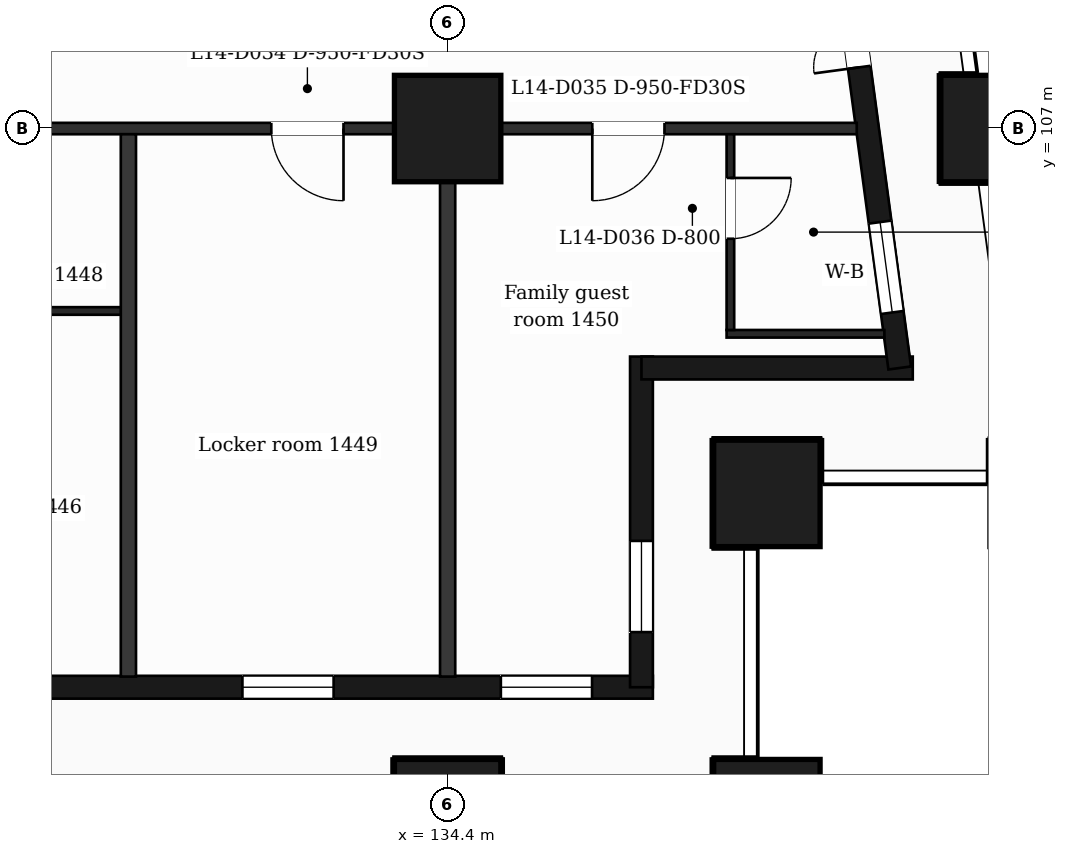
"""IFC4 building model, lengths in metres.
Left out: names, types, materials, properties, quantities, classifications, styles, units other than length and angle.
Written with IfcOpenShell. Run it as: python <this file> out.ifc"""

import sys

from ifc_helpers import new_model, si_unit, direction, frame, frame_2d, origin, origin_2d, place, context, subcontext, project, spatial, rectangle, extrude, element, fill, save


model = new_model("IFC4")
c1 = context("Model", 3, precision=1e-05, world=origin(), true_north=direction((0.0, 1.0)))
c2 = subcontext(c1, "Body", "Model", "MODEL_VIEW")
j1 = project(units=[si_unit("LENGTHUNIT", "METRE"), si_unit("PLANEANGLEUNIT", "RADIAN")], contexts=[c1])
p1 = place(None, origin())
s1 = spatial("IfcSite", under=j1, at=p1, CompositionType="ELEMENT")
p2 = place(p1, origin())
s2 = spatial("IfcBuilding", under=s1, at=p2, CompositionType="ELEMENT")
p3 = place(p2, frame((0.0, 0.0, 67.0)))
s3 = spatial("IfcBuildingStorey", under=s2, at=p3, CompositionType="ELEMENT", Elevation=67.0)
for number, where, z_axis, x_axis in (
    (1, (134.4, 98.0, 0.0), (0.0, 0.0, 1.0), (1.0, 0.0, 0.0)),
    (2, (138.6, 98.0, 0.0), (0.0, 0.0, 1.0), (1.0, 0.0, 0.0)),
    (3, (138.6, 102.2, 0.0), (0.0, 0.0, 1.0), (1.0, 0.0, 0.0)),
    (4, (134.4, 107.0, 0.0), (0.0, 0.0, 1.0), (1.0, 0.0, 0.0)),
    (5, (141.588, 107.0, 0.0), (0.0, 0.0, 1.0), (1.0, 0.0, 0.0)),
):
    element("IfcColumn", number, at=place(p3, frame(where, z_axis=z_axis, x_axis=x_axis)), inside=s3, PredefinedType="COLUMN", context=c2, shape_type="SweptSolid", body=[
        extrude(rectangle(XDim=1.4, YDim=1.4, at=origin_2d()), origin(), (0.0, 0.0, 1.0), 3.5),
    ])
p4 = place(p3, frame((89.85, 99.65, 0.0), z_axis=(0.0, 0.0, 1.0), x_axis=(1.0, 0.0, 0.0)))
e6 = element("IfcWall", 6, at=p4, inside=s3, PredefinedType="SOLIDWALL", context=c2, shape_type="SweptSolid", body=[
    extrude(rectangle(XDim=47.25, YDim=0.3, at=frame_2d((23.625, 0.0))), origin(), (0.0, 0.0, 1.0), 3.18),
])
p5 = place(p4, frame((0.725, 0.0, 0.9)))
e7 = element("IfcOpeningElement", 7, at=p5, cuts=e6, PredefinedType="OPENING", context=c2, shape_type="SweptSolid", body=[
    extrude(rectangle(XDim=1.2, YDim=2.1, at=frame_2d((0.6, 1.05))), frame((0.0, 0.16, 0.0), z_axis=(0.0, -1.0, 0.0), x_axis=(1.0, 0.0, 0.0)), (0.0, 0.0, 1.0), 0.32),
])
p6 = place(p4, frame((3.45, 0.0, 0.9)))
e8 = element("IfcOpeningElement", 8, at=p6, cuts=e6, PredefinedType="OPENING", context=c2, shape_type="SweptSolid", body=[
    extrude(rectangle(XDim=2.4, YDim=2.1, at=frame_2d((1.2, 1.05))), frame((0.0, 0.16, 0.0), z_axis=(0.0, -1.0, 0.0), x_axis=(1.0, 0.0, 0.0)), (0.0, 0.0, 1.0), 0.32),
])
p7 = place(p4, frame((8.25, 0.0, 0.9)))
e9 = element("IfcOpeningElement", 9, at=p7, cuts=e6, PredefinedType="OPENING", context=c2, shape_type="SweptSolid", body=[
    extrude(rectangle(XDim=1.2, YDim=2.1, at=frame_2d((0.6, 1.05))), frame((0.0, 0.16, 0.0), z_axis=(0.0, -1.0, 0.0), x_axis=(1.0, 0.0, 0.0)), (0.0, 0.0, 1.0), 0.32),
])
p8 = place(p4, frame((12.45, 0.0, 0.9)))
e10 = element("IfcOpeningElement", 10, at=p8, cuts=e6, PredefinedType="OPENING", context=c2, shape_type="SweptSolid", body=[
    extrude(rectangle(XDim=1.2, YDim=2.1, at=frame_2d((0.6, 1.05))), frame((0.0, 0.16, 0.0), z_axis=(0.0, -1.0, 0.0), x_axis=(1.0, 0.0, 0.0)), (0.0, 0.0, 1.0), 0.32),
])
p9 = place(p4, frame((16.05, 0.0, 0.9)))
e11 = element("IfcOpeningElement", 11, at=p9, cuts=e6, PredefinedType="OPENING", context=c2, shape_type="SweptSolid", body=[
    extrude(rectangle(XDim=2.4, YDim=2.1, at=frame_2d((1.2, 1.05))), frame((0.0, 0.16, 0.0), z_axis=(0.0, -1.0, 0.0), x_axis=(1.0, 0.0, 0.0)), (0.0, 0.0, 1.0), 0.32),
])
p10 = place(p4, frame((20.25, 0.0, 0.9)))
e12 = element("IfcOpeningElement", 12, at=p10, cuts=e6, PredefinedType="OPENING", context=c2, shape_type="SweptSolid", body=[
    extrude(rectangle(XDim=2.4, YDim=2.1, at=frame_2d((1.2, 1.05))), frame((0.0, 0.16, 0.0), z_axis=(0.0, -1.0, 0.0), x_axis=(1.0, 0.0, 0.0)), (0.0, 0.0, 1.0), 0.32),
])
p11 = place(p4, frame((25.05, 0.0, 0.0)))
e13 = element("IfcOpeningElement", 13, at=p11, cuts=e6, PredefinedType="OPENING", context=c2, shape_type="SweptSolid", body=[
    extrude(rectangle(XDim=1.2, YDim=2.4, at=frame_2d((0.6, 1.2))), frame((0.0, 0.16, 0.0), z_axis=(0.0, -1.0, 0.0), x_axis=(1.0, 0.0, 0.0)), (0.0, 0.0, 1.0), 0.32),
])
p12 = place(p4, frame((28.65, 0.0, 0.9)))
e14 = element("IfcOpeningElement", 14, at=p12, cuts=e6, PredefinedType="OPENING", context=c2, shape_type="SweptSolid", body=[
    extrude(rectangle(XDim=2.4, YDim=2.1, at=frame_2d((1.2, 1.05))), frame((0.0, 0.16, 0.0), z_axis=(0.0, -1.0, 0.0), x_axis=(1.0, 0.0, 0.0)), (0.0, 0.0, 1.0), 0.32),
])
p13 = place(p4, frame((32.85, 0.0, 0.9)))
e15 = element("IfcOpeningElement", 15, at=p13, cuts=e6, PredefinedType="OPENING", context=c2, shape_type="SweptSolid", body=[
    extrude(rectangle(XDim=2.4, YDim=2.1, at=frame_2d((1.2, 1.05))), frame((0.0, 0.16, 0.0), z_axis=(0.0, -1.0, 0.0), x_axis=(1.0, 0.0, 0.0)), (0.0, 0.0, 1.0), 0.32),
])
p14 = place(p4, frame((37.65, 0.0, 0.9)))
e16 = element("IfcOpeningElement", 16, at=p14, cuts=e6, PredefinedType="OPENING", context=c2, shape_type="SweptSolid", body=[
    extrude(rectangle(XDim=1.2, YDim=2.1, at=frame_2d((0.6, 1.05))), frame((0.0, 0.16, 0.0), z_axis=(0.0, -1.0, 0.0), x_axis=(1.0, 0.0, 0.0)), (0.0, 0.0, 1.0), 0.32),
])
p15 = place(p4, frame((41.85, 0.0, 0.9)))
e17 = element("IfcOpeningElement", 17, at=p15, cuts=e6, PredefinedType="OPENING", context=c2, shape_type="SweptSolid", body=[
    extrude(rectangle(XDim=1.2, YDim=2.1, at=frame_2d((0.6, 1.05))), frame((0.0, 0.16, 0.0), z_axis=(0.0, -1.0, 0.0), x_axis=(1.0, 0.0, 0.0)), (0.0, 0.0, 1.0), 0.32),
])
p16 = place(p4, frame((45.25, 0.0, 0.9)))
e18 = element("IfcOpeningElement", 18, at=p16, cuts=e6, PredefinedType="OPENING", context=c2, shape_type="SweptSolid", body=[
    extrude(rectangle(XDim=1.2, YDim=2.1, at=frame_2d((0.6, 1.05))), frame((0.0, 0.16, 0.0), z_axis=(0.0, -1.0, 0.0), x_axis=(1.0, 0.0, 0.0)), (0.0, 0.0, 1.0), 0.32),
])
p17 = place(p3, frame((136.95, 99.65, 0.0), z_axis=(0.0, 0.0, 1.0), x_axis=(0.0, 1.0, 0.0)))
e19 = element("IfcWall", 19, at=p17, inside=s3, PredefinedType="SOLIDWALL", context=c2, shape_type="SweptSolid", body=[
    extrude(rectangle(XDim=4.35, YDim=0.3, at=frame_2d((2.175, 0.0))), origin(), (0.0, 0.0, 1.0), 3.18),
])
p18 = place(p17, frame((0.725, 0.0, 0.9)))
e20 = element("IfcOpeningElement", 20, at=p18, cuts=e19, PredefinedType="OPENING", context=c2, shape_type="SweptSolid", body=[
    extrude(rectangle(XDim=1.2, YDim=2.1, at=frame_2d((0.6, 1.05))), frame((0.0, 0.16, 0.0), z_axis=(0.0, -1.0, 0.0), x_axis=(1.0, 0.0, 0.0)), (0.0, 0.0, 1.0), 0.32),
])
p19 = place(p3, frame((136.95, 103.85, 0.0), z_axis=(0.0, 0.0, 1.0), x_axis=(1.0, 0.0, 0.0)))
e21 = element("IfcWall", 21, at=p19, inside=s3, PredefinedType="SOLIDWALL", context=c2, shape_type="SweptSolid", body=[
    extrude(rectangle(XDim=3.569, YDim=0.3, at=frame_2d((1.785, 0.0))), origin(), (0.0, 0.0, 1.0), 3.18),
])
p20 = place(p3, frame((140.348, 103.85, 0.0), z_axis=(0.0, 0.0, 1.0), x_axis=(-0.133431549479, 0.991058031401, 0.0)))
e22 = element("IfcWall", 22, at=p20, inside=s3, PredefinedType="SOLIDWALL", context=c2, shape_type="SweptSolid", body=[
    extrude(rectangle(XDim=6.609, YDim=0.3, at=frame_2d((3.304, 0.0))), origin(), (0.0, 0.0, 1.0), 3.18),
])
p21 = place(p20, frame((0.737, 0.0, 0.9)))
e23 = element("IfcOpeningElement", 23, at=p21, cuts=e22, PredefinedType="OPENING", context=c2, shape_type="SweptSolid", body=[
    extrude(rectangle(XDim=1.2, YDim=2.1, at=frame_2d((0.6, 1.05))), frame((0.0, 0.16, 0.0), z_axis=(0.0, -1.0, 0.0), x_axis=(1.0, 0.0, 0.0)), (0.0, 0.0, 1.0), 0.32),
])
p22 = place(p20, frame((3.991, 0.0, 0.0)))
e24 = element("IfcOpeningElement", 24, at=p22, cuts=e22, PredefinedType="OPENING", context=c2, shape_type="SweptSolid", body=[
    extrude(rectangle(XDim=1.2, YDim=2.4, at=frame_2d((0.6, 1.2))), frame((0.0, 0.16, 0.0), z_axis=(0.0, -1.0, 0.0), x_axis=(1.0, 0.0, 0.0)), (0.0, 0.0, 1.0), 0.32),
])
p23 = place(p3, frame((138.07, 104.3, 0.0), z_axis=(0.0, 0.0, 1.0), x_axis=(1.0, 0.0, 0.0)))
e25 = element("IfcWall", 25, at=p23, inside=s3, PredefinedType="PARTITIONING", context=c2, shape_type="SweptSolid", body=[
    extrude(rectangle(XDim=2.076, YDim=0.1, at=frame_2d((1.038, 0.0))), origin(), (0.0, 0.0, 1.0), 3.18),
])
p24 = place(p3, frame((127.75, 104.6, 0.0), z_axis=(0.0, 0.0, 1.0), x_axis=(1.0, 0.0, 0.0)))
e26 = element("IfcWall", 26, at=p24, inside=s3, PredefinedType="PARTITIONING", context=c2, shape_type="SweptSolid", body=[
    extrude(rectangle(XDim=2.45, YDim=0.1, at=frame_2d((1.225, 0.0))), origin(), (0.0, 0.0, 1.0), 3.18),
])
p25 = place(p3, frame((87.018, 107.0, 0.0), z_axis=(0.0, 0.0, 1.0), x_axis=(1.0, 0.0, 0.0)))
e27 = element("IfcWall", 27, at=p25, inside=s3, PredefinedType="PARTITIONING", context=c2, shape_type="SweptSolid", body=[
    extrude(rectangle(XDim=52.765, YDim=0.15, at=frame_2d((26.382, 0.0))), origin(), (0.0, 0.0, 1.0), 3.18),
])
p26 = place(p25, frame((0.87, 0.0, 0.0)))
e28 = element("IfcOpeningElement", 28, at=p26, cuts=e27, PredefinedType="OPENING", context=c2, shape_type="SweptSolid", body=[
    extrude(rectangle(XDim=0.95, YDim=2.1, at=frame_2d((0.475, 1.05))), frame((0.0, 0.085, 0.0), z_axis=(0.0, -1.0, 0.0), x_axis=(1.0, 0.0, 0.0)), (0.0, 0.0, 1.0), 0.17),
])
p27 = place(p25, frame((6.332, 0.0, 0.0)))
e29 = element("IfcOpeningElement", 29, at=p27, cuts=e27, PredefinedType="OPENING", context=c2, shape_type="SweptSolid", body=[
    extrude(rectangle(XDim=0.95, YDim=2.1, at=frame_2d((0.475, 1.05))), frame((0.0, 0.085, 0.0), z_axis=(0.0, -1.0, 0.0), x_axis=(1.0, 0.0, 0.0)), (0.0, 0.0, 1.0), 0.17),
])
p28 = place(p25, frame((11.882, 0.0, 0.0)))
e30 = element("IfcOpeningElement", 30, at=p28, cuts=e27, PredefinedType="OPENING", context=c2, shape_type="SweptSolid", body=[
    extrude(rectangle(XDim=0.95, YDim=2.1, at=frame_2d((0.475, 1.05))), frame((0.0, 0.085, 0.0), z_axis=(0.0, -1.0, 0.0), x_axis=(1.0, 0.0, 0.0)), (0.0, 0.0, 1.0), 0.17),
])
p29 = place(p25, frame((16.757, 0.0, 0.0)))
e31 = element("IfcOpeningElement", 31, at=p29, cuts=e27, PredefinedType="OPENING", context=c2, shape_type="SweptSolid", body=[
    extrude(rectangle(XDim=0.95, YDim=2.1, at=frame_2d((0.475, 1.05))), frame((0.0, 0.085, 0.0), z_axis=(0.0, -1.0, 0.0), x_axis=(1.0, 0.0, 0.0)), (0.0, 0.0, 1.0), 0.17),
])
p30 = place(p25, frame((20.319, 0.0, 0.0)))
e32 = element("IfcOpeningElement", 32, at=p30, cuts=e27, PredefinedType="OPENING", context=c2, shape_type="SweptSolid", body=[
    extrude(rectangle(XDim=0.95, YDim=2.1, at=frame_2d((0.475, 1.05))), frame((0.0, 0.085, 0.0), z_axis=(0.0, -1.0, 0.0), x_axis=(1.0, 0.0, 0.0)), (0.0, 0.0, 1.0), 0.17),
])
p31 = place(p25, frame((23.132, 0.0, 0.0)))
e33 = element("IfcOpeningElement", 33, at=p31, cuts=e27, PredefinedType="OPENING", context=c2, shape_type="SweptSolid", body=[
    extrude(rectangle(XDim=0.95, YDim=2.1, at=frame_2d((0.475, 1.05))), frame((0.0, 0.085, 0.0), z_axis=(0.0, -1.0, 0.0), x_axis=(1.0, 0.0, 0.0)), (0.0, 0.0, 1.0), 0.17),
])
p32 = place(p25, frame((26.657, 0.0, 0.0)))
e34 = element("IfcOpeningElement", 34, at=p32, cuts=e27, PredefinedType="OPENING", context=c2, shape_type="SweptSolid", body=[
    extrude(rectangle(XDim=0.95, YDim=2.1, at=frame_2d((0.475, 1.05))), frame((0.0, 0.085, 0.0), z_axis=(0.0, -1.0, 0.0), x_axis=(1.0, 0.0, 0.0)), (0.0, 0.0, 1.0), 0.17),
])
p33 = place(p25, frame((34.952, 0.0, 0.0)))
e35 = element("IfcOpeningElement", 35, at=p33, cuts=e27, PredefinedType="OPENING", context=c2, shape_type="SweptSolid", body=[
    extrude(rectangle(XDim=1.0, YDim=2.1, at=frame_2d((0.5, 1.05))), frame((0.0, 0.085, 0.0), z_axis=(0.0, -1.0, 0.0), x_axis=(1.0, 0.0, 0.0)), (0.0, 0.0, 1.0), 0.17),
])
p34 = place(p25, frame((45.062, 0.0, 0.0)))
e36 = element("IfcOpeningElement", 36, at=p34, cuts=e27, PredefinedType="OPENING", context=c2, shape_type="SweptSolid", body=[
    extrude(rectangle(XDim=0.95, YDim=2.1, at=frame_2d((0.475, 1.05))), frame((0.0, 0.085, 0.0), z_axis=(0.0, -1.0, 0.0), x_axis=(1.0, 0.0, 0.0)), (0.0, 0.0, 1.0), 0.17),
])
p35 = place(p25, frame((49.285, 0.0, 0.0)))
e37 = element("IfcOpeningElement", 37, at=p35, cuts=e27, PredefinedType="OPENING", context=c2, shape_type="SweptSolid", body=[
    extrude(rectangle(XDim=0.95, YDim=2.1, at=frame_2d((0.475, 1.05))), frame((0.0, 0.085, 0.0), z_axis=(0.0, -1.0, 0.0), x_axis=(1.0, 0.0, 0.0)), (0.0, 0.0, 1.0), 0.17),
])
for number, where, z_axis, x_axis in (
    (38, (130.2, 99.79, 0.0), (0.0, 0.0, 1.0), (0.0, 1.0, 0.0)),
    (39, (134.4, 99.79, 0.0), (0.0, 0.0, 1.0), (0.0, 1.0, 0.0)),
):
    element("IfcWall", number, at=place(p3, frame(where, z_axis=z_axis, x_axis=x_axis)), inside=s3, PredefinedType="PARTITIONING", context=c2, shape_type="SweptSolid", body=[
        extrude(rectangle(XDim=7.135, YDim=0.2, at=frame_2d((3.567, 0.0))), origin(), (0.0, 0.0, 1.0), 3.18),
    ])
p36 = place(p3, frame((138.12, 104.35, 0.0), z_axis=(0.0, 0.0, 1.0), x_axis=(0.0, 1.0, 0.0)))
e40 = element("IfcWall", 40, at=p36, inside=s3, PredefinedType="PARTITIONING", context=c2, shape_type="SweptSolid", body=[
    extrude(rectangle(XDim=2.575, YDim=0.1, at=frame_2d((1.288, 0.0))), origin(), (0.0, 0.0, 1.0), 3.18),
])
p37 = place(p36, frame((1.2, 0.0, 0.0)))
e41 = element("IfcOpeningElement", 41, at=p37, cuts=e40, PredefinedType="OPENING", context=c2, shape_type="SweptSolid", body=[
    extrude(rectangle(XDim=0.8, YDim=2.1, at=frame_2d((0.4, 1.05))), frame((0.0, 0.06, 0.0), z_axis=(0.0, -1.0, 0.0), x_axis=(1.0, 0.0, 0.0)), (0.0, 0.0, 1.0), 0.12),
])
p38 = place(p15, origin())
e42 = element("IfcWindow", 42, at=p38, inside=s3, PartitioningType="SINGLE_PANEL", PredefinedType="WINDOW", context=c2, shape_type="SweptSolid", body=[
    extrude(rectangle(XDim=1.2, YDim=2.1, at=frame_2d((0.6, 1.05))), frame((0.0, 0.03, 0.0), z_axis=(0.0, -1.0, 0.0), x_axis=(1.0, 0.0, 0.0)), (0.0, 0.0, 1.0), 0.06),
])
fill(e17, e42)
p39 = place(p16, origin())
e43 = element("IfcWindow", 43, at=p39, inside=s3, PartitioningType="SINGLE_PANEL", PredefinedType="WINDOW", context=c2, shape_type="SweptSolid", body=[
    extrude(rectangle(XDim=1.2, YDim=2.1, at=frame_2d((0.6, 1.05))), frame((0.0, 0.03, 0.0), z_axis=(0.0, -1.0, 0.0), x_axis=(1.0, 0.0, 0.0)), (0.0, 0.0, 1.0), 0.06),
])
fill(e18, e43)
p40 = place(p18, origin())
e44 = element("IfcWindow", 44, at=p40, inside=s3, PartitioningType="SINGLE_PANEL", PredefinedType="WINDOW", context=c2, shape_type="SweptSolid", body=[
    extrude(rectangle(XDim=1.2, YDim=2.1, at=frame_2d((0.6, 1.05))), frame((0.0, 0.03, 0.0), z_axis=(0.0, -1.0, 0.0), x_axis=(1.0, 0.0, 0.0)), (0.0, 0.0, 1.0), 0.06),
])
fill(e20, e44)
p41 = place(p21, origin())
e45 = element("IfcWindow", 45, at=p41, inside=s3, PartitioningType="SINGLE_PANEL", PredefinedType="WINDOW", context=c2, shape_type="SweptSolid", body=[
    extrude(rectangle(XDim=1.2, YDim=2.1, at=frame_2d((0.6, 1.05))), frame((0.0, 0.03, 0.0), z_axis=(0.0, -1.0, 0.0), x_axis=(1.0, 0.0, 0.0)), (0.0, 0.0, 1.0), 0.06),
])
fill(e23, e45)
p42 = place(p22, origin())
e46 = element("IfcDoor", 46, at=p42, inside=s3, OperationType="DOUBLE_DOOR_SINGLE_SWING", PredefinedType="DOOR", context=c2, shape_type="SweptSolid", body=[
    extrude(rectangle(XDim=1.2, YDim=2.4, at=frame_2d((0.6, 1.2))), frame((0.0, 0.025, 0.0), z_axis=(0.0, -1.0, 0.0), x_axis=(1.0, 0.0, 0.0)), (0.0, 0.0, 1.0), 0.05),
])
fill(e24, e46)
p43 = place(p34, origin())
e47 = element("IfcDoor", 47, at=p43, inside=s3, OperationType="SINGLE_SWING_RIGHT", PredefinedType="DOOR", context=c2, shape_type="SweptSolid", body=[
    extrude(rectangle(XDim=0.95, YDim=2.1, at=frame_2d((0.475, 1.05))), frame((0.0, 0.025, 0.0), z_axis=(0.0, -1.0, 0.0), x_axis=(1.0, 0.0, 0.0)), (0.0, 0.0, 1.0), 0.05),
])
fill(e36, e47)
p44 = place(p35, origin())
e48 = element("IfcDoor", 48, at=p44, inside=s3, OperationType="SINGLE_SWING_LEFT", PredefinedType="DOOR", context=c2, shape_type="SweptSolid", body=[
    extrude(rectangle(XDim=0.95, YDim=2.1, at=frame_2d((0.475, 1.05))), frame((0.0, 0.025, 0.0), z_axis=(0.0, -1.0, 0.0), x_axis=(1.0, 0.0, 0.0)), (0.0, 0.0, 1.0), 0.05),
])
fill(e37, e48)
p45 = place(p37, origin())
e49 = element("IfcDoor", 49, at=p45, inside=s3, OperationType="SINGLE_SWING_RIGHT", PredefinedType="DOOR", context=c2, shape_type="SweptSolid", body=[
    extrude(rectangle(XDim=0.8, YDim=2.1, at=frame_2d((0.4, 1.05))), frame((0.0, 0.025, 0.0), z_axis=(0.0, -1.0, 0.0), x_axis=(1.0, 0.0, 0.0)), (0.0, 0.0, 1.0), 0.05),
])
fill(e41, e49)
save(model, sys.argv[1])
